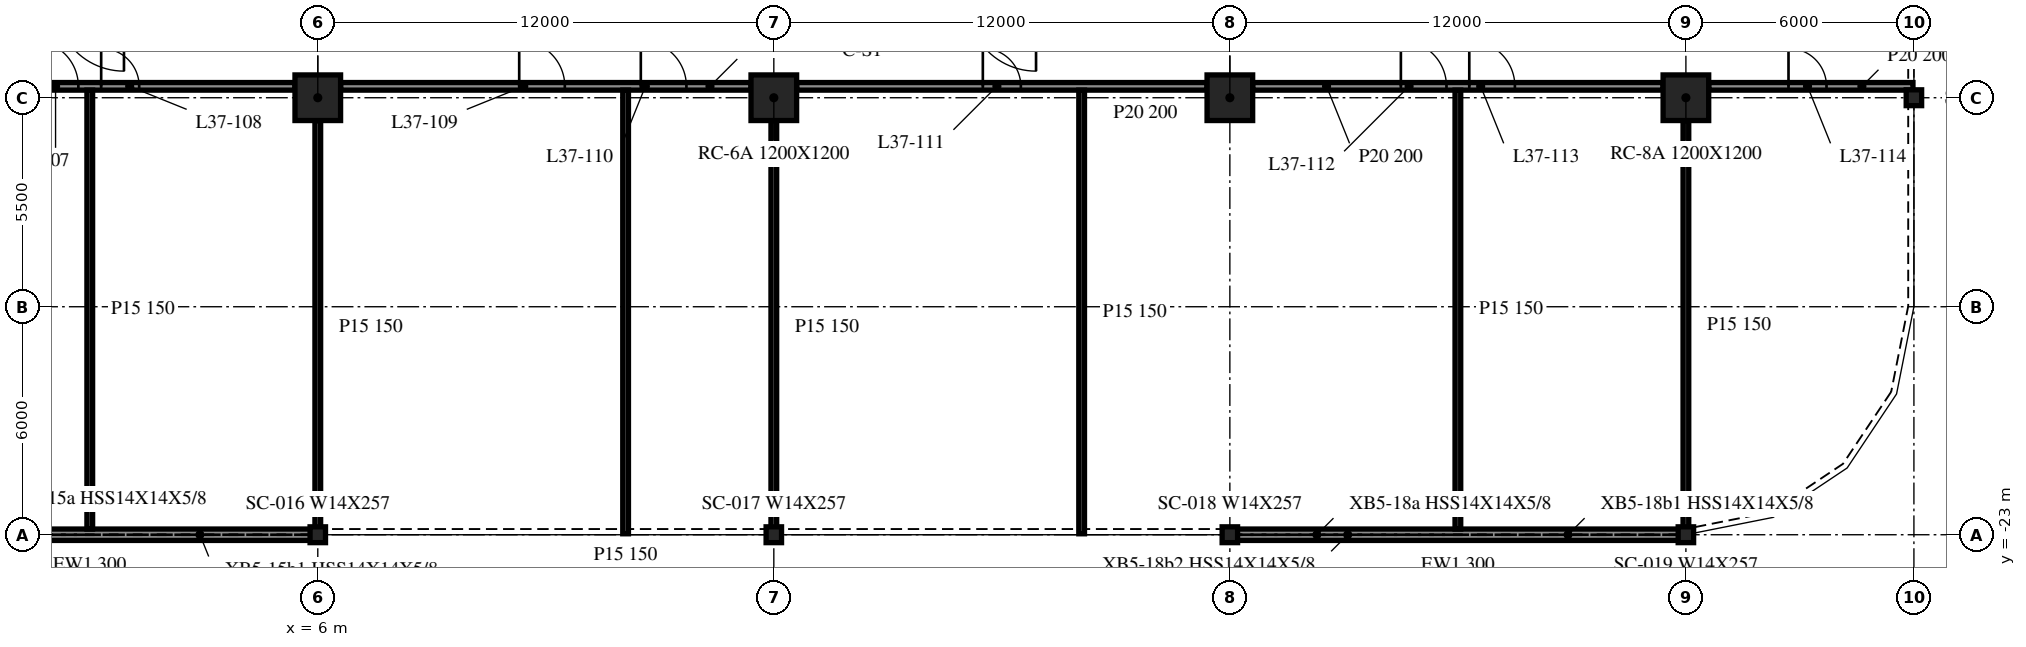
"""IFC4 building model, lengths in metres.
Left out: names, types, materials, properties, quantities, classifications, styles, units other than length and angle.
Written with IfcOpenShell. Run it as: python <this file> out.ifc"""

import sys

from ifc_helpers import new_model, si_unit, direction, frame, frame_2d, origin, origin_2d, place, context, subcontext, project, spatial, rectangle, i_section, extrude, element, fill, save


model = new_model("IFC4")
c1 = context("Model", 3, precision=1e-05, world=origin(), true_north=direction((0.0, 1.0)))
c2 = subcontext(c1, "Body", "Model", "MODEL_VIEW")
j1 = project(units=[si_unit("LENGTHUNIT", "METRE"), si_unit("PLANEANGLEUNIT", "RADIAN")], contexts=[c1])
p1 = place(None, origin())
s1 = spatial("IfcSite", under=j1, at=p1, CompositionType="ELEMENT")
p2 = place(p1, origin())
s2 = spatial("IfcBuilding", under=s1, at=p2, CompositionType="ELEMENT")
p3 = place(p2, frame((0.0, 0.0, 159.2)))
s3 = spatial("IfcBuildingStorey", under=s2, at=p3, CompositionType="ELEMENT", Elevation=159.2)
for number, where, z_axis, x_axis in (
    (1, (6.0, -11.5, -0.34), (0.0, 0.0, 1.0), (1.0, 0.0, 0.0)),
    (2, (18.0, -11.5, -0.34), (0.0, 0.0, 1.0), (1.0, 0.0, 0.0)),
    (3, (30.0, -11.5, -0.34), (0.0, 0.0, 1.0), (1.0, 0.0, 0.0)),
    (4, (42.0, -11.5, -0.34), (0.0, 0.0, 1.0), (1.0, 0.0, 0.0)),
):
    element("IfcColumn", number, at=place(p3, frame(where, z_axis=z_axis, x_axis=x_axis)), inside=s3, PredefinedType="COLUMN", context=c2, shape_type="SweptSolid", body=[
        extrude(rectangle(XDim=1.2, YDim=1.2, at=origin_2d()), origin(), (0.0, 0.0, 1.0), 3.8),
    ])
for number, where, z_axis, x_axis in (
    (5, (6.0, -23.0, -0.34), (0.0, 0.0, 1.0), (1.0, 0.0, 0.0)),
    (6, (18.0, -23.0, -0.34), (0.0, 0.0, 1.0), (1.0, 0.0, 0.0)),
    (7, (30.0, -23.0, -0.34), (0.0, 0.0, 1.0), (1.0, 0.0, 0.0)),
    (8, (42.0, -23.0, -0.34), (0.0, 0.0, 1.0), (1.0, 0.0, 0.0)),
    (9, (48.0, -11.5, -0.34), (0.0, 0.0, 1.0), (1.0, 0.0, 0.0)),
):
    element("IfcColumn", number, at=place(p3, frame(where, z_axis=z_axis, x_axis=x_axis)), inside=s3, PredefinedType="COLUMN", context=c2, shape_type="SweptSolid", body=[
        extrude(i_section(OverallWidth=0.406, OverallDepth=0.417, WebThickness=0.03, FlangeThickness=0.048, at=origin_2d()), origin(), (0.0, 0.0, 1.0), 3.8),
    ])
for number, where, z_axis, x_axis in (
    (10, (-5.985, -23.0, 0.0), (0.0, 0.0, 1.0), (1.0, 0.0, 0.0)),
    (11, (30.015, -23.0, 0.0), (0.0, 0.0, 1.0), (1.0, 0.0, 0.0)),
):
    element("IfcWall", number, at=place(p3, frame(where, z_axis=z_axis, x_axis=x_axis)), inside=s3, PredefinedType="NOTDEFINED", context=c2, shape_type="SweptSolid", body=[
        extrude(rectangle(XDim=11.97, YDim=0.3, at=frame_2d((5.985, 0.0))), origin(), (0.0, 0.0, 1.0), 2.782),
    ])
p4 = place(p3, frame((-5.4, -11.2, 0.0), z_axis=(0.0, 0.0, 1.0), x_axis=(1.0, 0.0, 0.0)))
e12 = element("IfcWall", 12, at=p4, inside=s3, PredefinedType="PARTITIONING", context=c2, shape_type="SweptSolid", body=[
    extrude(rectangle(XDim=10.8, YDim=0.2, at=frame_2d((5.4, 0.0))), origin(), (0.0, 0.0, 1.0), 3.46),
])
p5 = place(p4, frame((3.9, 0.0, 0.0)))
e13 = element("IfcOpeningElement", 13, at=p5, cuts=e12, PredefinedType="OPENING", context=c2, shape_type="SweptSolid", body=[
    extrude(rectangle(XDim=1.2, YDim=2.1, at=frame_2d((0.6, 1.05))), frame((0.0, 0.11, 0.0), z_axis=(0.0, -1.0, 0.0), x_axis=(1.0, 0.0, 0.0)), (0.0, 0.0, 1.0), 0.22),
])
p6 = place(p4, frame((5.7, 0.0, 0.0)))
e14 = element("IfcOpeningElement", 14, at=p6, cuts=e12, PredefinedType="OPENING", context=c2, shape_type="SweptSolid", body=[
    extrude(rectangle(XDim=1.0, YDim=2.1, at=frame_2d((0.5, 1.05))), frame((0.0, 0.11, 0.0), z_axis=(0.0, -1.0, 0.0), x_axis=(1.0, 0.0, 0.0)), (0.0, 0.0, 1.0), 0.22),
])
p7 = place(p3, frame((6.6, -11.2, 0.0), z_axis=(0.0, 0.0, 1.0), x_axis=(1.0, 0.0, 0.0)))
e15 = element("IfcWall", 15, at=p7, inside=s3, PredefinedType="PARTITIONING", context=c2, shape_type="SweptSolid", body=[
    extrude(rectangle(XDim=10.8, YDim=0.2, at=frame_2d((5.4, 0.0))), origin(), (0.0, 0.0, 1.0), 3.46),
])
p8 = place(p7, frame((4.7, 0.0, 0.0)))
e16 = element("IfcOpeningElement", 16, at=p8, cuts=e15, PredefinedType="OPENING", context=c2, shape_type="SweptSolid", body=[
    extrude(rectangle(XDim=1.2, YDim=2.1, at=frame_2d((0.6, 1.05))), frame((0.0, 0.11, 0.0), z_axis=(0.0, -1.0, 0.0), x_axis=(1.0, 0.0, 0.0)), (0.0, 0.0, 1.0), 0.22),
])
p9 = place(p7, frame((7.9, 0.0, 0.0)))
e17 = element("IfcOpeningElement", 17, at=p9, cuts=e15, PredefinedType="OPENING", context=c2, shape_type="SweptSolid", body=[
    extrude(rectangle(XDim=1.2, YDim=2.1, at=frame_2d((0.6, 1.05))), frame((0.0, 0.11, 0.0), z_axis=(0.0, -1.0, 0.0), x_axis=(1.0, 0.0, 0.0)), (0.0, 0.0, 1.0), 0.22),
])
p10 = place(p3, frame((18.6, -11.2, 0.0), z_axis=(0.0, 0.0, 1.0), x_axis=(1.0, 0.0, 0.0)))
e18 = element("IfcWall", 18, at=p10, inside=s3, PredefinedType="PARTITIONING", context=c2, shape_type="SweptSolid", body=[
    extrude(rectangle(XDim=10.8, YDim=0.2, at=frame_2d((5.4, 0.0))), origin(), (0.0, 0.0, 1.0), 3.46),
])
p11 = place(p10, frame((4.9, 0.0, 0.0)))
e19 = element("IfcOpeningElement", 19, at=p11, cuts=e18, PredefinedType="OPENING", context=c2, shape_type="SweptSolid", body=[
    extrude(rectangle(XDim=1.0, YDim=2.1, at=frame_2d((0.5, 1.05))), frame((0.0, 0.11, 0.0), z_axis=(0.0, -1.0, 0.0), x_axis=(1.0, 0.0, 0.0)), (0.0, 0.0, 1.0), 0.22),
])
p12 = place(p3, frame((30.6, -11.2, 0.0), z_axis=(0.0, 0.0, 1.0), x_axis=(1.0, 0.0, 0.0)))
e20 = element("IfcWall", 20, at=p12, inside=s3, PredefinedType="PARTITIONING", context=c2, shape_type="SweptSolid", body=[
    extrude(rectangle(XDim=10.8, YDim=0.2, at=frame_2d((5.4, 0.0))), origin(), (0.0, 0.0, 1.0), 3.46),
])
p13 = place(p12, frame((3.9, 0.0, 0.0)))
e21 = element("IfcOpeningElement", 21, at=p13, cuts=e20, PredefinedType="OPENING", context=c2, shape_type="SweptSolid", body=[
    extrude(rectangle(XDim=1.2, YDim=2.1, at=frame_2d((0.6, 1.05))), frame((0.0, 0.11, 0.0), z_axis=(0.0, -1.0, 0.0), x_axis=(1.0, 0.0, 0.0)), (0.0, 0.0, 1.0), 0.22),
])
p14 = place(p12, frame((5.7, 0.0, 0.0)))
e22 = element("IfcOpeningElement", 22, at=p14, cuts=e20, PredefinedType="OPENING", context=c2, shape_type="SweptSolid", body=[
    extrude(rectangle(XDim=1.2, YDim=2.1, at=frame_2d((0.6, 1.05))), frame((0.0, 0.11, 0.0), z_axis=(0.0, -1.0, 0.0), x_axis=(1.0, 0.0, 0.0)), (0.0, 0.0, 1.0), 0.22),
])
p15 = place(p3, frame((42.6, -11.2, 0.0), z_axis=(0.0, 0.0, 1.0), x_axis=(1.0, 0.0, 0.0)))
e23 = element("IfcWall", 23, at=p15, inside=s3, PredefinedType="PARTITIONING", context=c2, shape_type="SweptSolid", body=[
    extrude(rectangle(XDim=5.375, YDim=0.2, at=frame_2d((2.688, 0.0))), origin(), (0.0, 0.0, 1.0), 3.46),
])
p16 = place(p15, frame((2.1, 0.0, 0.0)))
e24 = element("IfcOpeningElement", 24, at=p16, cuts=e23, PredefinedType="OPENING", context=c2, shape_type="SweptSolid", body=[
    extrude(rectangle(XDim=1.0, YDim=2.1, at=frame_2d((0.5, 1.05))), frame((0.0, 0.11, 0.0), z_axis=(0.0, -1.0, 0.0), x_axis=(1.0, 0.0, 0.0)), (0.0, 0.0, 1.0), 0.22),
])
p17 = place(p3, frame((0.0, -22.85, 0.0), z_axis=(0.0, 0.0, 1.0), x_axis=(0.0, 1.0, 0.0)))
e25 = element("IfcWall", 25, at=p17, inside=s3, PredefinedType="PARTITIONING", context=c2, shape_type="SweptSolid", body=[
    extrude(rectangle(XDim=11.55, YDim=0.15, at=frame_2d((5.775, 0.0))), origin(), (0.0, 0.0, 1.0), 3.46),
])
p18 = place(p3, frame((6.0, -22.975, 0.0), z_axis=(0.0, 0.0, 1.0), x_axis=(0.0, 1.0, 0.0)))
e26 = element("IfcWall", 26, at=p18, inside=s3, PredefinedType="PARTITIONING", context=c2, shape_type="SweptSolid", body=[
    extrude(rectangle(XDim=10.875, YDim=0.15, at=frame_2d((5.438, 0.0))), origin(), (0.0, 0.0, 1.0), 3.46),
])
p19 = place(p3, frame((14.1, -22.975, 0.0), z_axis=(0.0, 0.0, 1.0), x_axis=(0.0, 1.0, 0.0)))
e27 = element("IfcWall", 27, at=p19, inside=s3, PredefinedType="PARTITIONING", context=c2, shape_type="SweptSolid", body=[
    extrude(rectangle(XDim=11.675, YDim=0.15, at=frame_2d((5.837, 0.0))), origin(), (0.0, 0.0, 1.0), 3.46),
])
p20 = place(p3, frame((18.0, -22.975, 0.0), z_axis=(0.0, 0.0, 1.0), x_axis=(0.0, 1.0, 0.0)))
e28 = element("IfcWall", 28, at=p20, inside=s3, PredefinedType="PARTITIONING", context=c2, shape_type="SweptSolid", body=[
    extrude(rectangle(XDim=10.875, YDim=0.15, at=frame_2d((5.438, 0.0))), origin(), (0.0, 0.0, 1.0), 3.46),
])
p21 = place(p3, frame((26.1, -22.975, 0.0), z_axis=(0.0, 0.0, 1.0), x_axis=(0.0, 1.0, 0.0)))
e29 = element("IfcWall", 29, at=p21, inside=s3, PredefinedType="PARTITIONING", context=c2, shape_type="SweptSolid", body=[
    extrude(rectangle(XDim=11.675, YDim=0.15, at=frame_2d((5.837, 0.0))), origin(), (0.0, 0.0, 1.0), 3.46),
])
p22 = place(p3, frame((36.0, -22.85, 0.0), z_axis=(0.0, 0.0, 1.0), x_axis=(0.0, 1.0, 0.0)))
e30 = element("IfcWall", 30, at=p22, inside=s3, PredefinedType="PARTITIONING", context=c2, shape_type="SweptSolid", body=[
    extrude(rectangle(XDim=11.55, YDim=0.15, at=frame_2d((5.775, 0.0))), origin(), (0.0, 0.0, 1.0), 3.46),
])
p23 = place(p3, frame((42.0, -22.847, 0.0), z_axis=(0.0, 0.0, 1.0), x_axis=(0.0, 1.0, 0.0)))
e31 = element("IfcWall", 31, at=p23, inside=s3, PredefinedType="PARTITIONING", context=c2, shape_type="SweptSolid", body=[
    extrude(rectangle(XDim=10.747, YDim=0.15, at=frame_2d((5.374, 0.0))), origin(), (0.0, 0.0, 1.0), 3.46),
])
p24 = place(p5, origin())
e32 = element("IfcDoor", 32, at=p24, inside=s3, OperationType="SINGLE_SWING_RIGHT", PredefinedType="DOOR", context=c2, shape_type="SweptSolid", body=[
    extrude(rectangle(XDim=1.2, YDim=2.1, at=frame_2d((0.6, 1.05))), frame((0.0, 0.025, 0.0), z_axis=(0.0, -1.0, 0.0), x_axis=(1.0, 0.0, 0.0)), (0.0, 0.0, 1.0), 0.05),
])
fill(e13, e32)
p25 = place(p6, origin())
e33 = element("IfcDoor", 33, at=p25, inside=s3, OperationType="SINGLE_SWING_LEFT", PredefinedType="DOOR", context=c2, shape_type="SweptSolid", body=[
    extrude(rectangle(XDim=1.0, YDim=2.1, at=frame_2d((0.5, 1.05))), frame((0.0, 0.025, 0.0), z_axis=(0.0, -1.0, 0.0), x_axis=(1.0, 0.0, 0.0)), (0.0, 0.0, 1.0), 0.05),
])
fill(e14, e33)
p26 = place(p8, origin())
e34 = element("IfcDoor", 34, at=p26, inside=s3, OperationType="SINGLE_SWING_RIGHT", PredefinedType="DOOR", context=c2, shape_type="SweptSolid", body=[
    extrude(rectangle(XDim=1.2, YDim=2.1, at=frame_2d((0.6, 1.05))), frame((0.0, 0.025, 0.0), z_axis=(0.0, -1.0, 0.0), x_axis=(1.0, 0.0, 0.0)), (0.0, 0.0, 1.0), 0.05),
])
fill(e16, e34)
p27 = place(p9, origin())
e35 = element("IfcDoor", 35, at=p27, inside=s3, OperationType="SINGLE_SWING_LEFT", PredefinedType="DOOR", context=c2, shape_type="SweptSolid", body=[
    extrude(rectangle(XDim=1.2, YDim=2.1, at=frame_2d((0.6, 1.05))), frame((0.0, 0.025, 0.0), z_axis=(0.0, -1.0, 0.0), x_axis=(1.0, 0.0, 0.0)), (0.0, 0.0, 1.0), 0.05),
])
fill(e17, e35)
p28 = place(p11, origin())
e36 = element("IfcDoor", 36, at=p28, inside=s3, OperationType="SINGLE_SWING_LEFT", PredefinedType="DOOR", context=c2, shape_type="SweptSolid", body=[
    extrude(rectangle(XDim=1.0, YDim=2.1, at=frame_2d((0.5, 1.05))), frame((0.0, 0.025, 0.0), z_axis=(0.0, -1.0, 0.0), x_axis=(1.0, 0.0, 0.0)), (0.0, 0.0, 1.0), 0.05),
])
fill(e19, e36)
p29 = place(p13, origin())
e37 = element("IfcDoor", 37, at=p29, inside=s3, OperationType="SINGLE_SWING_RIGHT", PredefinedType="DOOR", context=c2, shape_type="SweptSolid", body=[
    extrude(rectangle(XDim=1.2, YDim=2.1, at=frame_2d((0.6, 1.05))), frame((0.0, 0.025, 0.0), z_axis=(0.0, -1.0, 0.0), x_axis=(1.0, 0.0, 0.0)), (0.0, 0.0, 1.0), 0.05),
])
fill(e21, e37)
p30 = place(p14, origin())
e38 = element("IfcDoor", 38, at=p30, inside=s3, OperationType="SINGLE_SWING_LEFT", PredefinedType="DOOR", context=c2, shape_type="SweptSolid", body=[
    extrude(rectangle(XDim=1.2, YDim=2.1, at=frame_2d((0.6, 1.05))), frame((0.0, 0.025, 0.0), z_axis=(0.0, -1.0, 0.0), x_axis=(1.0, 0.0, 0.0)), (0.0, 0.0, 1.0), 0.05),
])
fill(e22, e38)
p31 = place(p16, origin())
e39 = element("IfcDoor", 39, at=p31, inside=s3, OperationType="SINGLE_SWING_RIGHT", PredefinedType="DOOR", context=c2, shape_type="SweptSolid", body=[
    extrude(rectangle(XDim=1.0, YDim=2.1, at=frame_2d((0.5, 1.05))), frame((0.0, 0.025, 0.0), z_axis=(0.0, -1.0, 0.0), x_axis=(1.0, 0.0, 0.0)), (0.0, 0.0, 1.0), 0.05),
])
fill(e24, e39)
save(model, sys.argv[1])
